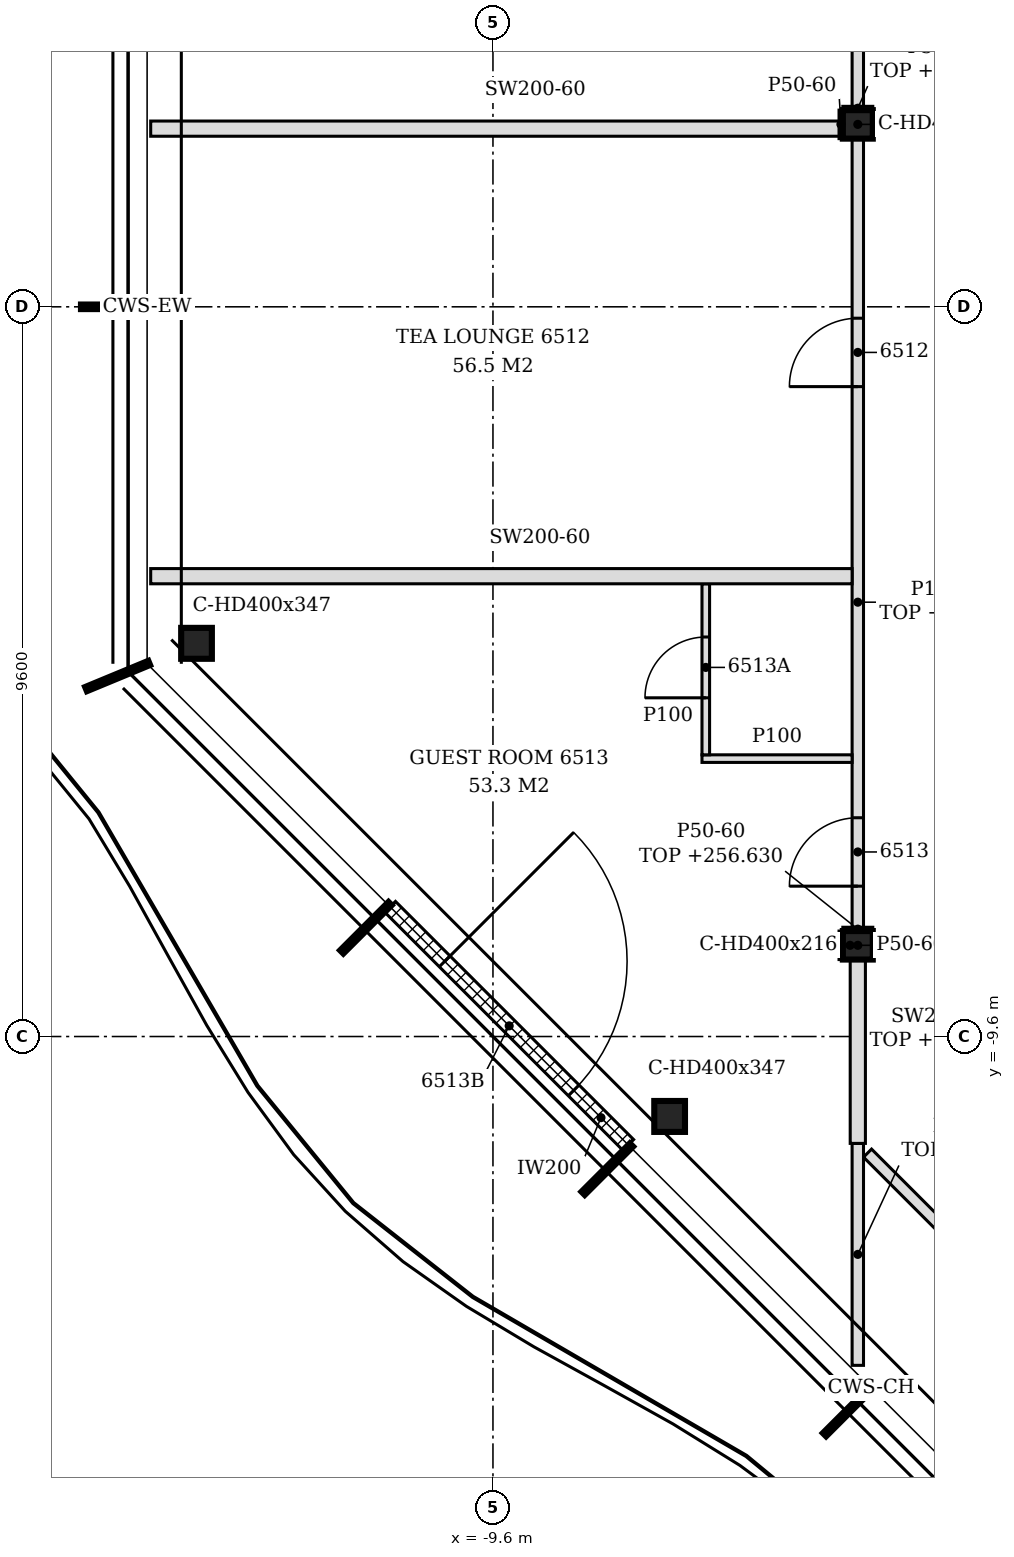
"""IFC4 building model, lengths in metres.
Left out: names, types, materials, properties, quantities, classifications, styles, units other than length and angle.
Written with IfcOpenShell. Run it as: python <this file> out.ifc"""

import sys

from ifc_helpers import new_model, si_unit, direction, frame, frame_2d, origin, origin_2d, place, context, subcontext, project, spatial, polyline, rectangle, i_section, outline, extrude, element, fill, save


model = new_model("IFC4")
c1 = context("Model", 3, precision=1e-05, world=origin(), true_north=direction((0.0, 1.0)))
c2 = subcontext(c1, "Body", "Model", "MODEL_VIEW")
j1 = project(units=[si_unit("LENGTHUNIT", "METRE"), si_unit("PLANEANGLEUNIT", "RADIAN")], contexts=[c1])
p1 = place(None, origin())
s1 = spatial("IfcSite", under=j1, at=p1, CompositionType="ELEMENT")
p2 = place(p1, origin())
s2 = spatial("IfcBuilding", under=s1, at=p2, CompositionType="ELEMENT")
p3 = place(p2, frame((0.0, 0.0, 253.8)))
s3 = spatial("IfcBuildingStorey", under=s2, at=p3, CompositionType="ELEMENT", Elevation=253.8)
for number, where, z_axis, x_axis in (
    (1, (-13.5, -4.427, -0.15), (0.0, 0.0, 1.0), (1.0, 0.0, 0.0)),
    (2, (-7.276, -10.652, -0.15), (0.0, 0.0, 1.0), (1.0, 0.0, 0.0)),
):
    element("IfcColumn", number, at=place(p3, frame(where, z_axis=z_axis, x_axis=x_axis)), inside=s3, PredefinedType="COLUMN", context=c2, shape_type="SweptSolid", body=[
        extrude(i_section(OverallWidth=0.404, OverallDepth=0.407, WebThickness=0.027, FlangeThickness=0.044, FilletRadius=0.015, at=origin_2d()), origin(), (0.0, 0.0, 1.0), 3.6),
    ])
for number, where, z_axis, x_axis in (
    (3, (-4.8, -8.4, -0.15), (0.0, 0.0, 1.0), (1.0, 0.0, 0.0)),
    (4, (-4.8, 2.4, -0.15), (0.0, 0.0, 1.0), (1.0, 0.0, 0.0)),
):
    element("IfcColumn", number, at=place(p3, frame(where, z_axis=z_axis, x_axis=x_axis)), inside=s3, PredefinedType="COLUMN", context=c2, shape_type="SweptSolid", body=[
        extrude(i_section(OverallWidth=0.394, OverallDepth=0.375, WebThickness=0.017, FlangeThickness=0.028, FilletRadius=0.015, at=origin_2d()), origin(), (0.0, 0.0, 1.0), 3.6),
    ])
p4 = place(p3, frame((-10.953, -7.893, 0.0), z_axis=(0.0, 0.0, 1.0), x_axis=(0.707106781187, -0.707106781187, 0.0)))
e5 = element("IfcWall", 5, at=p4, inside=s3, PredefinedType="NOTDEFINED", context=c2, shape_type="SweptSolid", body=[
    extrude(rectangle(XDim=4.431, YDim=0.2, at=frame_2d((2.215, 0.0))), origin(), (0.0, 0.0, 1.0), 3.45),
])
p5 = place(p4, frame((1.015, 0.0, 0.0)))
e6 = element("IfcOpeningElement", 6, at=p5, cuts=e5, PredefinedType="OPENING", context=c2, shape_type="SweptSolid", body=[
    extrude(rectangle(XDim=2.4, YDim=2.4, at=frame_2d((1.2, 1.2))), frame((0.0, 0.11, 0.0), z_axis=(0.0, -1.0, 0.0), x_axis=(1.0, 0.0, 0.0)), (0.0, 0.0, 1.0), 0.22),
])
p6 = place(p3, frame((-1.534, -14.272, 0.0), z_axis=(0.0, 0.0, 1.0), x_axis=(-0.707134287042, 0.707079274261, 0.0)))
e7 = element("IfcWall", 7, at=p6, inside=s3, PredefinedType="PARTITIONING", context=c2, shape_type="SweptSolid", body=[
    extrude(rectangle(XDim=4.438, YDim=0.15, at=frame_2d((2.219, 0.0))), origin(), (0.0, 0.0, 1.0), 2.93),
])
p7 = place(p3, frame((-4.8, -13.926, 0.0), z_axis=(0.0, 0.0, 1.0), x_axis=(0.0, 1.0, 0.0)))
e8 = element("IfcWall", 8, at=p7, inside=s3, PredefinedType="PARTITIONING", context=c2, shape_type="SweptSolid", body=[
    extrude(outline(polyline([(0.0, 0.0), (2.92, 0.0), (2.92, 3.03), (1.369, 3.03), (1.367, 2.63), (0.229, 2.63), (0.227, 3.03), (0.0, 3.03), (0.0, 0.0)])), frame((0.0, 0.075, 0.0), z_axis=(0.0, -1.0, 0.0), x_axis=(1.0, 0.0, 0.0)), (0.0, 0.0, 1.0), 0.15),
])
p8 = place(p3, frame((-4.8, -11.006, 0.0), z_axis=(0.0, 0.0, 1.0), x_axis=(0.0, 1.0, 0.0)))
e9 = element("IfcWall", 9, at=p8, inside=s3, PredefinedType="PARTITIONING", context=c2, shape_type="SweptSolid", body=[
    extrude(rectangle(XDim=2.419, YDim=0.2, at=frame_2d((1.209, 0.0))), origin(), (0.0, 0.0, 1.0), 3.03),
])
p9 = place(p3, frame((-4.603, -8.4, 0.0), z_axis=(0.0, 0.0, 1.0), x_axis=(1.0, 0.0, 0.0)))
e10 = element("IfcWall", 10, at=p9, inside=s3, PredefinedType="PARTITIONING", context=c2, shape_type="SweptSolid", body=[
    extrude(rectangle(XDim=9.478, YDim=0.15, at=frame_2d((4.739, 0.0))), origin(), (0.0, 0.0, 1.0), 2.83),
])
p10 = place(p9, frame((4.153, 0.0, 0.0)))
e11 = element("IfcOpeningElement", 11, at=p10, cuts=e10, PredefinedType="OPENING", context=c2, shape_type="SweptSolid", body=[
    extrude(rectangle(XDim=0.9, YDim=2.1, at=frame_2d((0.45, 1.05))), frame((0.0, 0.085, 0.0), z_axis=(0.0, -1.0, 0.0), x_axis=(1.0, 0.0, 0.0)), (0.0, 0.0, 1.0), 0.17),
])
p11 = place(p3, frame((-4.8, -8.212, 0.0), z_axis=(0.0, 0.0, 1.0), x_axis=(0.0, 1.0, 0.0)))
e12 = element("IfcWall", 12, at=p11, inside=s3, PredefinedType="PARTITIONING", context=c2, shape_type="SweptSolid", body=[
    extrude(rectangle(XDim=10.425, YDim=0.15, at=frame_2d((5.212, 0.0))), origin(), (0.0, 0.0, 1.0), 2.83),
])
p12 = place(p11, frame((7.163, 0.0, 0.0)))
e13 = element("IfcOpeningElement", 13, at=p12, cuts=e12, PredefinedType="OPENING", context=c2, shape_type="SweptSolid", body=[
    extrude(rectangle(XDim=0.9, YDim=2.1, at=frame_2d((0.45, 1.05))), frame((0.0, 0.085, 0.0), z_axis=(0.0, -1.0, 0.0), x_axis=(1.0, 0.0, 0.0)), (0.0, 0.0, 1.0), 0.17),
])
p13 = place(p11, frame((0.591, 0.0, 0.0)))
e14 = element("IfcOpeningElement", 14, at=p13, cuts=e12, PredefinedType="OPENING", context=c2, shape_type="SweptSolid", body=[
    extrude(rectangle(XDim=0.9, YDim=2.1, at=frame_2d((0.45, 1.05))), frame((0.0, 0.085, 0.0), z_axis=(0.0, -1.0, 0.0), x_axis=(1.0, 0.0, 0.0)), (0.0, 0.0, 1.0), 0.17),
])
p14 = place(p3, frame((-6.85, -5.944, 0.0), z_axis=(0.0, 0.0, 1.0), x_axis=(1.0, 0.0, 0.0)))
e15 = element("IfcWall", 15, at=p14, inside=s3, PredefinedType="PARTITIONING", context=c2, shape_type="SweptSolid", body=[
    extrude(outline(polyline([(0.0, 0.0), (1.975, 0.0), (1.975, 2.83), (1.9, 2.83), (1.898, 3.45), (0.0, 3.45), (0.0, 0.0)])), frame((0.0, 0.05, 0.0), z_axis=(0.0, -1.0, 0.0), x_axis=(1.0, 0.0, 0.0)), (0.0, 0.0, 1.0), 0.1),
])
p15 = place(p3, frame((-6.8, -5.894, 0.0), z_axis=(0.0, 0.0, 1.0), x_axis=(0.0, 1.0, 0.0)))
e16 = element("IfcWall", 16, at=p15, inside=s3, PredefinedType="PARTITIONING", context=c2, shape_type="SweptSolid", body=[
    extrude(outline(polyline([(0.0, 0.0), (2.25, 0.0), (2.25, 3.45), (1.189, 3.45), (1.187, 2.98), (0.999, 2.98), (0.997, 3.45), (0.0, 3.45), (0.0, 0.0)])), frame((0.0, 0.05, 0.0), z_axis=(0.0, -1.0, 0.0), x_axis=(1.0, 0.0, 0.0)), (0.0, 0.0, 1.0), 0.1),
])
p16 = place(p15, frame((0.75, 0.0, 0.0)))
e17 = element("IfcOpeningElement", 17, at=p16, cuts=e16, PredefinedType="OPENING", context=c2, shape_type="SweptSolid", body=[
    extrude(rectangle(XDim=0.8, YDim=2.1, at=frame_2d((0.4, 1.05))), frame((0.0, 0.06, 0.0), z_axis=(0.0, -1.0, 0.0), x_axis=(1.0, 0.0, 0.0)), (0.0, 0.0, 1.0), 0.12),
])
p17 = place(p3, frame((-14.103, -3.544, 0.0), z_axis=(0.0, 0.0, 1.0), x_axis=(1.0, 0.0, 0.0)))
e18 = element("IfcWall", 18, at=p17, inside=s3, PredefinedType="PARTITIONING", context=c2, shape_type="SweptSolid", body=[
    extrude(outline(polyline([(0.0, 0.0), (9.228, 0.0), (9.228, 2.83), (9.153, 2.83), (9.151, 3.45), (0.753, 3.45), (0.751, 2.93), (0.453, 2.93), (0.451, 3.45), (0.0, 3.45), (0.0, 0.0)])), frame((0.0, 0.1, 0.0), z_axis=(0.0, -1.0, 0.0), x_axis=(1.0, 0.0, 0.0)), (0.0, 0.0, 1.0), 0.2),
])
p18 = place(p3, frame((-14.103, 2.344, 0.0), z_axis=(0.0, 0.0, 1.0), x_axis=(1.0, 0.0, 0.0)))
e19 = element("IfcWall", 19, at=p18, inside=s3, PredefinedType="PARTITIONING", context=c2, shape_type="SweptSolid", body=[
    extrude(outline(polyline([(0.0, 0.0), (9.106, 0.0), (9.106, 3.45), (0.753, 3.45), (0.751, 2.93), (0.453, 2.93), (0.451, 3.45), (0.0, 3.45), (0.0, 0.0)])), frame((0.0, 0.1, 0.0), z_axis=(0.0, -1.0, 0.0), x_axis=(1.0, 0.0, 0.0)), (0.0, 0.0, 1.0), 0.2),
])
p19 = place(p3, frame((-4.8, 2.587, 0.0), z_axis=(0.0, 0.0, 1.0), x_axis=(0.0, 1.0, 0.0)))
e20 = element("IfcWall", 20, at=p19, inside=s3, PredefinedType="PARTITIONING", context=c2, shape_type="SweptSolid", body=[
    extrude(outline(polyline([(0.0, 0.0), (10.425, 0.0), (10.425, 2.63), (9.97, 2.63), (9.968, 2.83), (0.0, 2.83), (0.0, 0.0)])), frame((0.0, 0.075, 0.0), z_axis=(0.0, -1.0, 0.0), x_axis=(1.0, 0.0, 0.0)), (0.0, 0.0, 1.0), 0.15),
])
for number, where, z_axis, x_axis in (
    (21, (-5.022, -8.587, 0.0), (0.0, 0.0, 1.0), (0.0, 1.0, 0.0)),
    (22, (-5.022, 2.212, 0.0), (0.0, 0.0, 1.0), (0.0, 1.0, 0.0)),
):
    element("IfcWall", number, at=place(p3, frame(where, z_axis=z_axis, x_axis=x_axis)), inside=s3, PredefinedType="PARTITIONING", context=c2, shape_type="SweptSolid", body=[
        extrude(rectangle(XDim=0.375, YDim=0.05, at=frame_2d((0.188, 0.0))), origin(), (0.0, 0.0, 1.0), 3.45),
    ])
for number, where, z_axis, x_axis in (
    (23, (-4.997, -8.188, 0.0), (0.0, 0.0, 1.0), (1.0, 0.0, 0.0)),
    (24, (-4.997, 2.613, 0.0), (0.0, 0.0, 1.0), (1.0, 0.0, 0.0)),
):
    element("IfcWall", number, at=place(p3, frame(where, z_axis=z_axis, x_axis=x_axis)), inside=s3, PredefinedType="PARTITIONING", context=c2, shape_type="SweptSolid", body=[
        extrude(rectangle(XDim=0.394, YDim=0.05, at=frame_2d((0.197, 0.0))), origin(), (0.0, 0.0, 1.0), 2.83),
    ])
p20 = place(p5, origin())
e25 = element("IfcDoor", 25, at=p20, inside=s3, OperationType="SINGLE_SWING_LEFT", PredefinedType="DOOR", context=c2, shape_type="SweptSolid", body=[
    extrude(rectangle(XDim=2.4, YDim=2.4, at=frame_2d((1.2, 1.2))), frame((0.0, 0.025, 0.0), z_axis=(0.0, -1.0, 0.0), x_axis=(1.0, 0.0, 0.0)), (0.0, 0.0, 1.0), 0.05),
])
fill(e6, e25)
p21 = place(p12, origin())
e26 = element("IfcDoor", 26, at=p21, inside=s3, OperationType="SINGLE_SWING_LEFT", PredefinedType="DOOR", context=c2, shape_type="SweptSolid", body=[
    extrude(rectangle(XDim=0.9, YDim=2.1, at=frame_2d((0.45, 1.05))), frame((0.0, 0.025, 0.0), z_axis=(0.0, -1.0, 0.0), x_axis=(1.0, 0.0, 0.0)), (0.0, 0.0, 1.0), 0.05),
])
fill(e13, e26)
p22 = place(p13, origin())
e27 = element("IfcDoor", 27, at=p22, inside=s3, OperationType="SINGLE_SWING_LEFT", PredefinedType="DOOR", context=c2, shape_type="SweptSolid", body=[
    extrude(rectangle(XDim=0.9, YDim=2.1, at=frame_2d((0.45, 1.05))), frame((0.0, 0.025, 0.0), z_axis=(0.0, -1.0, 0.0), x_axis=(1.0, 0.0, 0.0)), (0.0, 0.0, 1.0), 0.05),
])
fill(e14, e27)
p23 = place(p16, origin())
e28 = element("IfcDoor", 28, at=p23, inside=s3, OperationType="SINGLE_SWING_LEFT", PredefinedType="DOOR", context=c2, shape_type="SweptSolid", body=[
    extrude(rectangle(XDim=0.8, YDim=2.1, at=frame_2d((0.4, 1.05))), frame((0.0, 0.025, 0.0), z_axis=(0.0, -1.0, 0.0), x_axis=(1.0, 0.0, 0.0)), (0.0, 0.0, 1.0), 0.05),
])
fill(e17, e28)
save(model, sys.argv[1])
